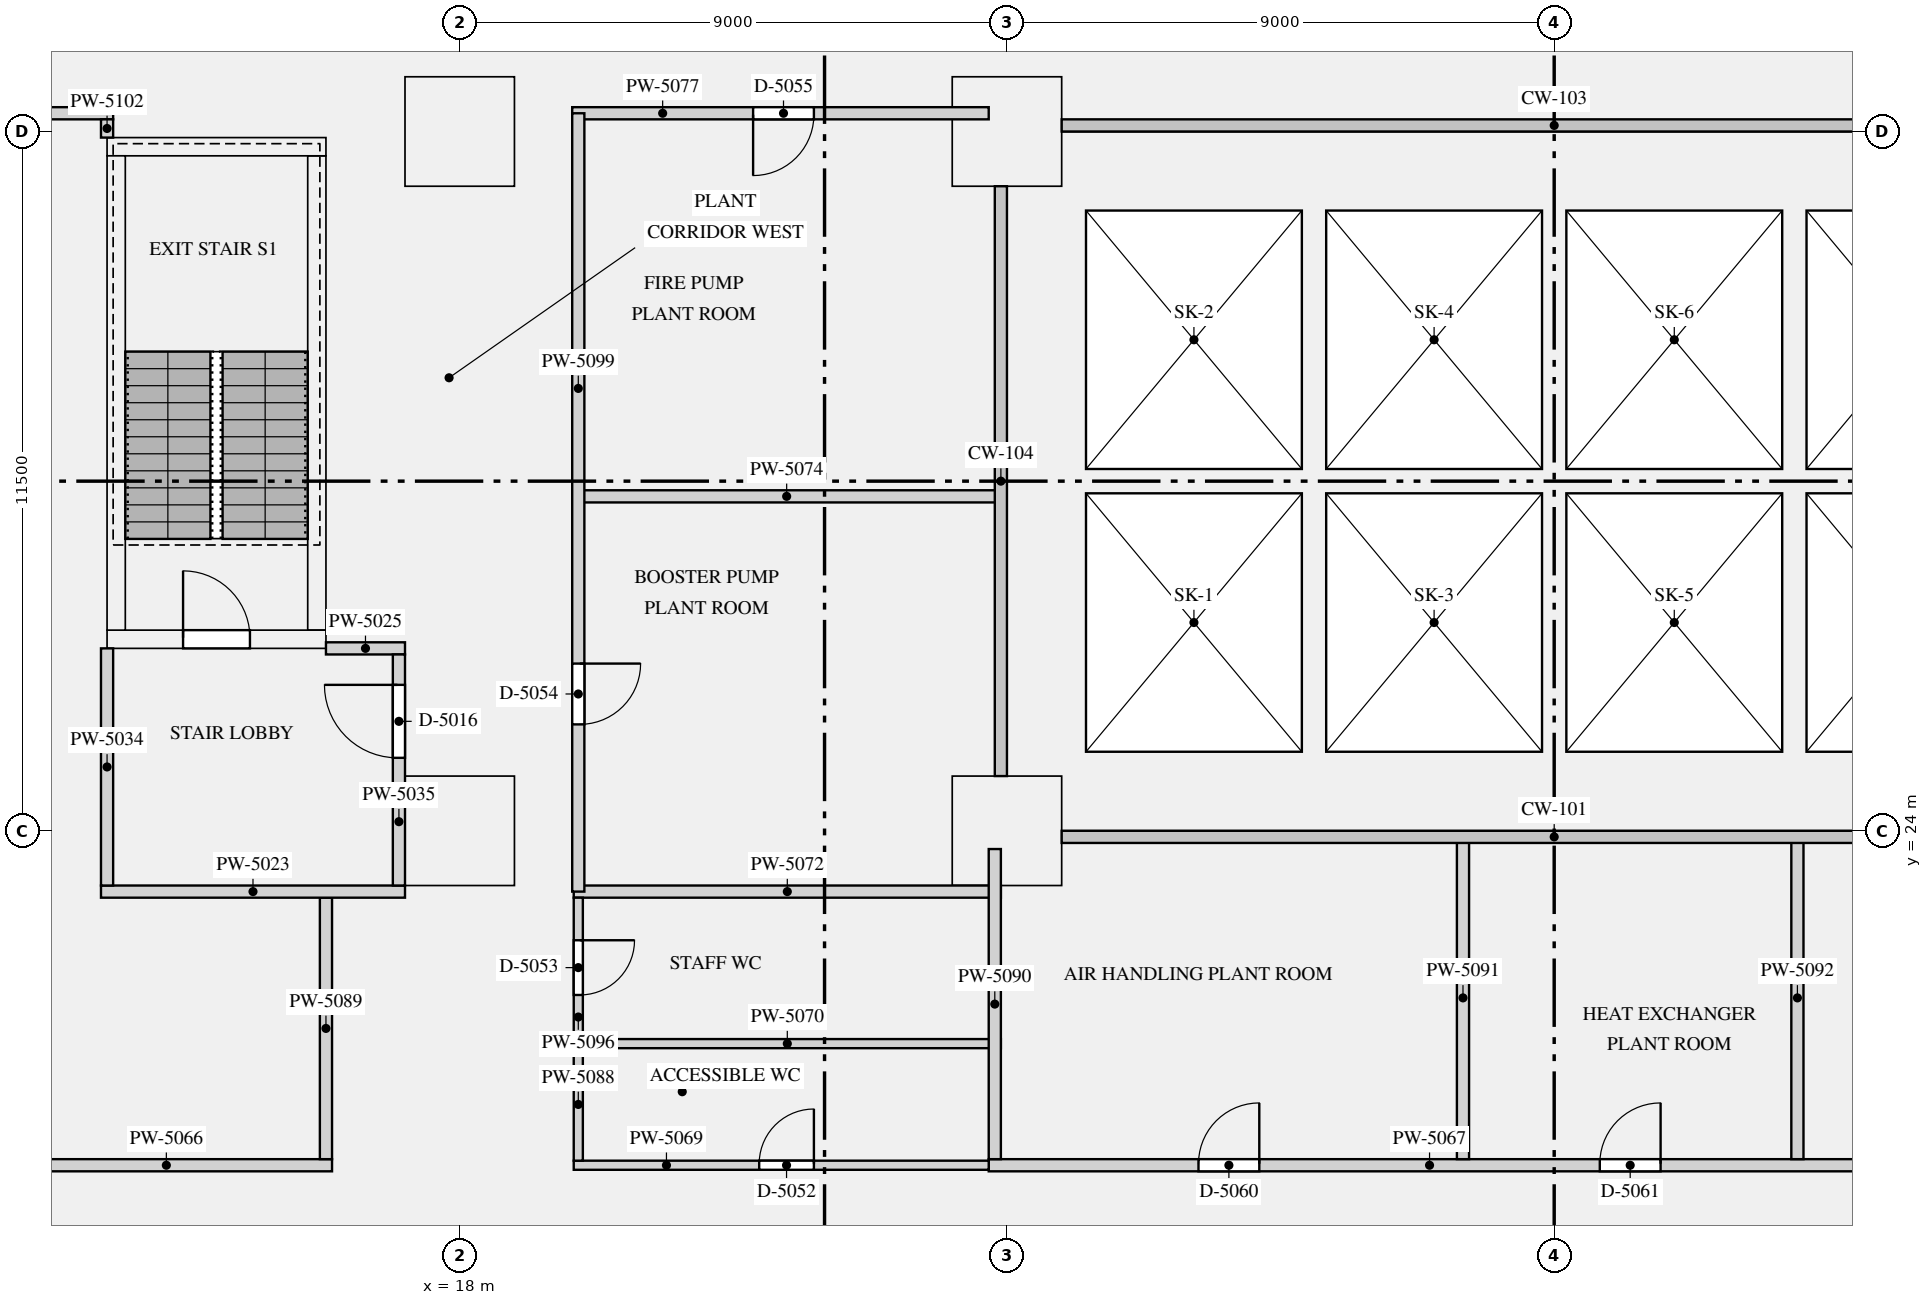
"""IFC4 building model, lengths in metres.
Left out: names, types, materials, properties, quantities, classifications, styles, units other than length and angle.
Written with IfcOpenShell. Run it as: python <this file> out.ifc"""

import sys

from ifc_helpers import new_model, si_unit, direction, frame, frame_2d, origin, origin_2d, place, context, subcontext, project, spatial, rectangle, extrude, element, fill, save


model = new_model("IFC4")
c1 = context("Model", 3, precision=1e-05, world=origin(), true_north=direction((0.0, 1.0)))
c2 = subcontext(c1, "Body", "Model", "MODEL_VIEW")
j1 = project(units=[si_unit("LENGTHUNIT", "METRE"), si_unit("PLANEANGLEUNIT", "RADIAN")], contexts=[c1])
p1 = place(None, origin())
s1 = spatial("IfcSite", under=j1, at=p1, CompositionType="ELEMENT")
p2 = place(p1, origin())
s2 = spatial("IfcBuilding", under=s1, at=p2, CompositionType="ELEMENT")
p3 = place(p2, frame((0.0, 0.0, 15.5)))
s3 = spatial("IfcBuildingStorey", under=s2, at=p3, CompositionType="ELEMENT", Elevation=15.5)
for number, where, z_axis, x_axis in (
    (1, (18.0, 24.0, 0.0), (0.0, 0.0, 1.0), (1.0, 0.0, 0.0)),
    (2, (18.0, 35.5, 0.0), (0.0, 0.0, 1.0), (1.0, 0.0, 0.0)),
    (3, (27.0, 24.0, 0.0), (0.0, 0.0, 1.0), (1.0, 0.0, 0.0)),
    (4, (27.0, 35.5, 0.0), (0.0, 0.0, 1.0), (1.0, 0.0, 0.0)),
):
    element("IfcColumn", number, at=place(p3, frame(where, z_axis=z_axis, x_axis=x_axis)), inside=s3, PredefinedType="COLUMN", context=c2, shape_type="SweptSolid", body=[
        extrude(rectangle(XDim=1.8, YDim=1.8, at=origin_2d()), origin(), (0.0, 0.0, 1.0), 4.0),
    ])
p4 = place(p3, frame((12.2, 27.15, 0.0), z_axis=(0.0, 0.0, 1.0), x_axis=(1.0, 0.0, 0.0)))
e5 = element("IfcWall", 5, at=p4, inside=s3, PredefinedType="SHEAR", context=c2, shape_type="SweptSolid", body=[
    extrude(rectangle(XDim=3.6, YDim=0.3, at=frame_2d((1.8, 0.0))), origin(), (0.0, 0.0, 1.0), 4.0),
])
p5 = place(p4, frame((1.25, 0.0, 0.0)))
e6 = element("IfcOpeningElement", 6, at=p5, cuts=e5, PredefinedType="OPENING", context=c2, shape_type="SweptSolid", body=[
    extrude(rectangle(XDim=1.1, YDim=2.1, at=frame_2d((0.55, 1.05))), frame((0.0, 0.16, 0.0), z_axis=(0.0, -1.0, 0.0), x_axis=(1.0, 0.0, 0.0)), (0.0, 0.0, 1.0), 0.32),
])
p6 = place(p3, frame((12.2, 35.25, 0.0), z_axis=(0.0, 0.0, 1.0), x_axis=(1.0, 0.0, 0.0)))
e7 = element("IfcWall", 7, at=p6, inside=s3, PredefinedType="SHEAR", context=c2, shape_type="SweptSolid", body=[
    extrude(rectangle(XDim=3.6, YDim=0.3, at=frame_2d((1.8, 0.0))), origin(), (0.0, 0.0, 1.0), 4.0),
])
for number, where, z_axis, x_axis in (
    (8, (12.35, 27.3, 0.0), (0.0, 0.0, 1.0), (0.0, 1.0, 0.0)),
    (9, (15.65, 27.3, 0.0), (0.0, 0.0, 1.0), (0.0, 1.0, 0.0)),
):
    element("IfcWall", number, at=place(p3, frame(where, z_axis=z_axis, x_axis=x_axis)), inside=s3, PredefinedType="SHEAR", context=c2, shape_type="SweptSolid", body=[
        extrude(rectangle(XDim=7.8, YDim=0.3, at=frame_2d((3.9, 0.0))), origin(), (0.0, 0.0, 1.0), 4.0),
    ])
p7 = place(p3, frame((12.1, 23.0, 0.0), z_axis=(0.0, 0.0, 1.0), x_axis=(1.0, 0.0, 0.0)))
e10 = element("IfcWall", 10, at=p7, inside=s3, PredefinedType="PARTITIONING", context=c2, shape_type="SweptSolid", body=[
    extrude(rectangle(XDim=5.0, YDim=0.2, at=frame_2d((2.5, 0.0))), origin(), (0.0, 0.0, 1.0), 3.68),
])
p8 = place(p3, frame((15.8, 27.0, 0.0), z_axis=(0.0, 0.0, 1.0), x_axis=(1.0, 0.0, 0.0)))
e11 = element("IfcWall", 11, at=p8, inside=s3, PredefinedType="PARTITIONING", context=c2, shape_type="SweptSolid", body=[
    extrude(rectangle(XDim=1.3, YDim=0.2, at=frame_2d((0.65, 0.0))), origin(), (0.0, 0.0, 1.0), 3.68),
])
p9 = place(p3, frame((12.2, 23.1, 0.0), z_axis=(0.0, 0.0, 1.0), x_axis=(0.0, 1.0, 0.0)))
e12 = element("IfcWall", 12, at=p9, inside=s3, PredefinedType="PARTITIONING", context=c2, shape_type="SweptSolid", body=[
    extrude(rectangle(XDim=3.9, YDim=0.2, at=frame_2d((1.95, 0.0))), origin(), (0.0, 0.0, 1.0), 3.68),
])
p10 = place(p3, frame((17.0, 23.1, 0.0), z_axis=(0.0, 0.0, 1.0), x_axis=(0.0, 1.0, 0.0)))
e13 = element("IfcWall", 13, at=p10, inside=s3, PredefinedType="PARTITIONING", context=c2, shape_type="SweptSolid", body=[
    extrude(rectangle(XDim=3.8, YDim=0.2, at=frame_2d((1.9, 0.0))), origin(), (0.0, 0.0, 1.0), 3.68),
])
p11 = place(p10, frame((2.1, 0.0, 0.0)))
e14 = element("IfcOpeningElement", 14, at=p11, cuts=e13, PredefinedType="OPENING", context=c2, shape_type="SweptSolid", body=[
    extrude(rectangle(XDim=1.2, YDim=2.1, at=frame_2d((0.6, 1.05))), frame((0.0, 0.11, 0.0), z_axis=(0.0, -1.0, 0.0), x_axis=(1.0, 0.0, 0.0)), (0.0, 0.0, 1.0), 0.22),
])
p12 = place(p3, frame((4.45, 18.5, 0.0), z_axis=(0.0, 0.0, 1.0), x_axis=(1.0, 0.0, 0.0)))
e15 = element("IfcWall", 15, at=p12, inside=s3, PredefinedType="PARTITIONING", context=c2, shape_type="SweptSolid", body=[
    extrude(rectangle(XDim=11.45, YDim=0.2, at=frame_2d((5.725, 0.0))), origin(), (0.0, 0.0, 1.0), 3.68),
])
p13 = place(p12, frame((4.2, 0.0, 0.0)))
e16 = element("IfcOpeningElement", 16, at=p13, cuts=e15, PredefinedType="OPENING", context=c2, shape_type="SweptSolid", body=[
    extrude(rectangle(XDim=1.8, YDim=2.1, at=frame_2d((0.9, 1.05))), frame((0.0, 0.11, 0.0), z_axis=(0.0, -1.0, 0.0), x_axis=(1.0, 0.0, 0.0)), (0.0, 0.0, 1.0), 0.22),
])
p14 = place(p3, frame((26.7, 18.5, 0.0), z_axis=(0.0, 0.0, 1.0), x_axis=(1.0, 0.0, 0.0)))
e17 = element("IfcWall", 17, at=p14, inside=s3, PredefinedType="PARTITIONING", context=c2, shape_type="SweptSolid", body=[
    extrude(rectangle(XDim=25.45, YDim=0.2, at=frame_2d((12.725, 0.0))), origin(), (0.0, 0.0, 1.0), 3.68),
])
p15 = place(p14, frame((21.425, 0.0, 0.0)))
e18 = element("IfcOpeningElement", 18, at=p15, cuts=e17, PredefinedType="OPENING", context=c2, shape_type="SweptSolid", body=[
    extrude(rectangle(XDim=1.0, YDim=2.1, at=frame_2d((0.5, 1.05))), frame((0.0, 0.11, 0.0), z_axis=(0.0, -1.0, 0.0), x_axis=(1.0, 0.0, 0.0)), (0.0, 0.0, 1.0), 0.22),
])
p16 = place(p14, frame((3.45, 0.0, 0.0)))
e19 = element("IfcOpeningElement", 19, at=p16, cuts=e17, PredefinedType="OPENING", context=c2, shape_type="SweptSolid", body=[
    extrude(rectangle(XDim=1.0, YDim=2.1, at=frame_2d((0.5, 1.05))), frame((0.0, 0.11, 0.0), z_axis=(0.0, -1.0, 0.0), x_axis=(1.0, 0.0, 0.0)), (0.0, 0.0, 1.0), 0.22),
])
p17 = place(p14, frame((10.05, 0.0, 0.0)))
e20 = element("IfcOpeningElement", 20, at=p17, cuts=e17, PredefinedType="OPENING", context=c2, shape_type="SweptSolid", body=[
    extrude(rectangle(XDim=1.0, YDim=2.1, at=frame_2d((0.5, 1.05))), frame((0.0, 0.11, 0.0), z_axis=(0.0, -1.0, 0.0), x_axis=(1.0, 0.0, 0.0)), (0.0, 0.0, 1.0), 0.22),
])
p18 = place(p14, frame((15.4, 0.0, 0.0)))
e21 = element("IfcOpeningElement", 21, at=p18, cuts=e17, PredefinedType="OPENING", context=c2, shape_type="SweptSolid", body=[
    extrude(rectangle(XDim=1.0, YDim=2.1, at=frame_2d((0.5, 1.05))), frame((0.0, 0.11, 0.0), z_axis=(0.0, -1.0, 0.0), x_axis=(1.0, 0.0, 0.0)), (0.0, 0.0, 1.0), 0.22),
])
p19 = place(p3, frame((19.875, 18.5, 0.0), z_axis=(0.0, 0.0, 1.0), x_axis=(1.0, 0.0, 0.0)))
e22 = element("IfcWall", 22, at=p19, inside=s3, PredefinedType="PARTITIONING", context=c2, shape_type="SweptSolid", body=[
    extrude(rectangle(XDim=6.825, YDim=0.15, at=frame_2d((3.413, 0.0))), origin(), (0.0, 0.0, 1.0), 3.68),
])
p20 = place(p19, frame((3.05, 0.0, 0.0)))
e23 = element("IfcOpeningElement", 23, at=p20, cuts=e22, PredefinedType="OPENING", context=c2, shape_type="SweptSolid", body=[
    extrude(rectangle(XDim=0.9, YDim=2.1, at=frame_2d((0.45, 1.05))), frame((0.0, 0.085, 0.0), z_axis=(0.0, -1.0, 0.0), x_axis=(1.0, 0.0, 0.0)), (0.0, 0.0, 1.0), 0.17),
])
p21 = place(p3, frame((19.875, 20.5, 0.0), z_axis=(0.0, 0.0, 1.0), x_axis=(1.0, 0.0, 0.0)))
e24 = element("IfcWall", 24, at=p21, inside=s3, PredefinedType="PARTITIONING", context=c2, shape_type="SweptSolid", body=[
    extrude(rectangle(XDim=7.025, YDim=0.15, at=frame_2d((3.512, 0.0))), origin(), (0.0, 0.0, 1.0), 3.68),
])
p22 = place(p3, frame((19.875, 23.0, 0.0), z_axis=(0.0, 0.0, 1.0), x_axis=(1.0, 0.0, 0.0)))
e25 = element("IfcWall", 25, at=p22, inside=s3, PredefinedType="PARTITIONING", context=c2, shape_type="SweptSolid", body=[
    extrude(rectangle(XDim=7.025, YDim=0.2, at=frame_2d((3.512, 0.0))), origin(), (0.0, 0.0, 1.0), 3.68),
])
p23 = place(p3, frame((19.85, 29.5, 0.0), z_axis=(0.0, 0.0, 1.0), x_axis=(1.0, 0.0, 0.0)))
e26 = element("IfcWall", 26, at=p23, inside=s3, PredefinedType="PARTITIONING", context=c2, shape_type="SweptSolid", body=[
    extrude(rectangle(XDim=7.054, YDim=0.2, at=frame_2d((3.527, 0.0))), origin(), (0.0, 0.0, 1.0), 3.68),
])
p24 = place(p3, frame((2.35, 35.8, 0.0), z_axis=(0.0, 0.0, 1.0), x_axis=(1.0, 0.0, 0.0)))
e27 = element("IfcWall", 27, at=p24, inside=s3, PredefinedType="PARTITIONING", context=c2, shape_type="SweptSolid", body=[
    extrude(rectangle(XDim=9.95, YDim=0.2, at=frame_2d((4.975, 0.0))), origin(), (0.0, 0.0, 1.0), 3.68),
])
p25 = place(p3, frame((19.85, 35.8, 0.0), z_axis=(0.0, 0.0, 1.0), x_axis=(1.0, 0.0, 0.0)))
e28 = element("IfcWall", 28, at=p25, inside=s3, PredefinedType="PARTITIONING", context=c2, shape_type="SweptSolid", body=[
    extrude(rectangle(XDim=6.85, YDim=0.2, at=frame_2d((3.425, 0.0))), origin(), (0.0, 0.0, 1.0), 3.68),
])
p26 = place(p25, frame((2.975, 0.0, 0.0)))
e29 = element("IfcOpeningElement", 29, at=p26, cuts=e28, PredefinedType="OPENING", context=c2, shape_type="SweptSolid", body=[
    extrude(rectangle(XDim=1.0, YDim=2.1, at=frame_2d((0.5, 1.05))), frame((0.0, 0.11, 0.0), z_axis=(0.0, -1.0, 0.0), x_axis=(1.0, 0.0, 0.0)), (0.0, 0.0, 1.0), 0.22),
])
p27 = place(p3, frame((19.95, 18.575, 0.0), z_axis=(0.0, 0.0, 1.0), x_axis=(0.0, 1.0, 0.0)))
e30 = element("IfcWall", 30, at=p27, inside=s3, PredefinedType="PARTITIONING", context=c2, shape_type="SweptSolid", body=[
    extrude(rectangle(XDim=1.85, YDim=0.15, at=frame_2d((0.925, 0.0))), origin(), (0.0, 0.0, 1.0), 3.68),
])
p28 = place(p3, frame((15.8, 18.6, 0.0), z_axis=(0.0, 0.0, 1.0), x_axis=(0.0, 1.0, 0.0)))
e31 = element("IfcWall", 31, at=p28, inside=s3, PredefinedType="PARTITIONING", context=c2, shape_type="SweptSolid", body=[
    extrude(rectangle(XDim=4.3, YDim=0.2, at=frame_2d((2.15, 0.0))), origin(), (0.0, 0.0, 1.0), 3.68),
])
p29 = place(p3, frame((26.8, 18.6, 0.0), z_axis=(0.0, 0.0, 1.0), x_axis=(0.0, 1.0, 0.0)))
e32 = element("IfcWall", 32, at=p29, inside=s3, PredefinedType="PARTITIONING", context=c2, shape_type="SweptSolid", body=[
    extrude(rectangle(XDim=5.1, YDim=0.2, at=frame_2d((2.55, 0.0))), origin(), (0.0, 0.0, 1.0), 3.68),
])
for number, where, z_axis, x_axis in (
    (33, (34.5, 18.6, 0.0), (0.0, 0.0, 1.0), (0.0, 1.0, 0.0)),
    (34, (40.0, 18.6, 0.0), (0.0, 0.0, 1.0), (0.0, 1.0, 0.0)),
):
    element("IfcWall", number, at=place(p3, frame(where, z_axis=z_axis, x_axis=x_axis)), inside=s3, PredefinedType="PARTITIONING", context=c2, shape_type="SweptSolid", body=[
        extrude(rectangle(XDim=5.304, YDim=0.2, at=frame_2d((2.652, 0.0))), origin(), (0.0, 0.0, 1.0), 3.68),
    ])
p30 = place(p3, frame((19.95, 20.575, 0.0), z_axis=(0.0, 0.0, 1.0), x_axis=(0.0, 1.0, 0.0)))
e35 = element("IfcWall", 35, at=p30, inside=s3, PredefinedType="PARTITIONING", context=c2, shape_type="SweptSolid", body=[
    extrude(rectangle(XDim=2.325, YDim=0.15, at=frame_2d((1.163, 0.0))), origin(), (0.0, 0.0, 1.0), 3.68),
])
p31 = place(p30, frame((0.725, 0.0, 0.0)))
e36 = element("IfcOpeningElement", 36, at=p31, cuts=e35, PredefinedType="OPENING", context=c2, shape_type="SweptSolid", body=[
    extrude(rectangle(XDim=0.9, YDim=2.1, at=frame_2d((0.45, 1.05))), frame((0.0, 0.085, 0.0), z_axis=(0.0, -1.0, 0.0), x_axis=(1.0, 0.0, 0.0)), (0.0, 0.0, 1.0), 0.17),
])
p32 = place(p3, frame((19.95, 23.0, 0.0), z_axis=(0.0, 0.0, 1.0), x_axis=(0.0, 1.0, 0.0)))
e37 = element("IfcWall", 37, at=p32, inside=s3, PredefinedType="PARTITIONING", context=c2, shape_type="SweptSolid", body=[
    extrude(rectangle(XDim=12.8, YDim=0.2, at=frame_2d((6.4, 0.0))), origin(), (0.0, 0.0, 1.0), 3.68),
])
p33 = place(p32, frame((2.75, 0.0, 0.0)))
e38 = element("IfcOpeningElement", 38, at=p33, cuts=e37, PredefinedType="OPENING", context=c2, shape_type="SweptSolid", body=[
    extrude(rectangle(XDim=1.0, YDim=2.1, at=frame_2d((0.5, 1.05))), frame((0.0, 0.11, 0.0), z_axis=(0.0, -1.0, 0.0), x_axis=(1.0, 0.0, 0.0)), (0.0, 0.0, 1.0), 0.22),
])
p34 = place(p3, frame((12.2, 35.4, 0.0), z_axis=(0.0, 0.0, 1.0), x_axis=(0.0, 1.0, 0.0)))
e39 = element("IfcWall", 39, at=p34, inside=s3, PredefinedType="PARTITIONING", context=c2, shape_type="SweptSolid", body=[
    extrude(rectangle(XDim=0.3, YDim=0.2, at=frame_2d((0.15, 0.0))), origin(), (0.0, 0.0, 1.0), 3.68),
])
p35 = place(p3, frame((0.0, 0.0, -0.6)))
p36 = place(p35, frame((30.075, 27.425, 0.0)))
p37 = place(p36, frame((0.0, 0.0, 0.55)))
e40 = element("IfcWindow", 40, at=p37, inside=s3, PartitioningType="SINGLE_PANEL", PredefinedType="SKYLIGHT", context=c2, shape_type="SweptSolid", body=[
    extrude(rectangle(XDim=3.55, YDim=4.25, at=origin_2d()), origin(), (0.0, 0.0, 1.0), 0.05),
])
p38 = place(p35, frame((30.075, 32.075, 0.0)))
p39 = place(p38, frame((0.0, 0.0, 0.55)))
e41 = element("IfcWindow", 41, at=p39, inside=s3, PartitioningType="SINGLE_PANEL", PredefinedType="SKYLIGHT", context=c2, shape_type="SweptSolid", body=[
    extrude(rectangle(XDim=3.55, YDim=4.25, at=origin_2d()), origin(), (0.0, 0.0, 1.0), 0.05),
])
p40 = place(p35, frame((34.025, 27.425, 0.0)))
p41 = place(p40, frame((0.0, 0.0, 0.55)))
e42 = element("IfcWindow", 42, at=p41, inside=s3, PartitioningType="SINGLE_PANEL", PredefinedType="SKYLIGHT", context=c2, shape_type="SweptSolid", body=[
    extrude(rectangle(XDim=3.55, YDim=4.25, at=origin_2d()), origin(), (0.0, 0.0, 1.0), 0.05),
])
p42 = place(p35, frame((34.025, 32.075, 0.0)))
p43 = place(p42, frame((0.0, 0.0, 0.55)))
e43 = element("IfcWindow", 43, at=p43, inside=s3, PartitioningType="SINGLE_PANEL", PredefinedType="SKYLIGHT", context=c2, shape_type="SweptSolid", body=[
    extrude(rectangle(XDim=3.55, YDim=4.25, at=origin_2d()), origin(), (0.0, 0.0, 1.0), 0.05),
])
p44 = place(p35, frame((37.975, 27.425, 0.0)))
p45 = place(p44, frame((0.0, 0.0, 0.55)))
e44 = element("IfcWindow", 44, at=p45, inside=s3, PartitioningType="SINGLE_PANEL", PredefinedType="SKYLIGHT", context=c2, shape_type="SweptSolid", body=[
    extrude(rectangle(XDim=3.55, YDim=4.25, at=origin_2d()), origin(), (0.0, 0.0, 1.0), 0.05),
])
p46 = place(p35, frame((37.975, 32.075, 0.0)))
p47 = place(p46, frame((0.0, 0.0, 0.55)))
e45 = element("IfcWindow", 45, at=p47, inside=s3, PartitioningType="SINGLE_PANEL", PredefinedType="SKYLIGHT", context=c2, shape_type="SweptSolid", body=[
    extrude(rectangle(XDim=3.55, YDim=4.25, at=origin_2d()), origin(), (0.0, 0.0, 1.0), 0.05),
])
p48 = place(p35, frame((41.925, 27.425, 0.0)))
p49 = place(p48, frame((0.0, 0.0, 0.55)))
e46 = element("IfcWindow", 46, at=p49, inside=s3, PartitioningType="SINGLE_PANEL", PredefinedType="SKYLIGHT", context=c2, shape_type="SweptSolid", body=[
    extrude(rectangle(XDim=3.55, YDim=4.25, at=origin_2d()), origin(), (0.0, 0.0, 1.0), 0.05),
])
p50 = place(p35, frame((41.925, 32.075, 0.0)))
p51 = place(p50, frame((0.0, 0.0, 0.55)))
e47 = element("IfcWindow", 47, at=p51, inside=s3, PartitioningType="SINGLE_PANEL", PredefinedType="SKYLIGHT", context=c2, shape_type="SweptSolid", body=[
    extrude(rectangle(XDim=3.55, YDim=4.25, at=origin_2d()), origin(), (0.0, 0.0, 1.0), 0.05),
])
p52 = place(p5, origin())
e48 = element("IfcDoor", 48, at=p52, inside=s3, OperationType="SINGLE_SWING_LEFT", PredefinedType="DOOR", context=c2, shape_type="SweptSolid", body=[
    extrude(rectangle(XDim=1.1, YDim=2.1, at=frame_2d((0.55, 1.05))), frame((0.0, 0.025, 0.0), z_axis=(0.0, -1.0, 0.0), x_axis=(1.0, 0.0, 0.0)), (0.0, 0.0, 1.0), 0.05),
])
fill(e6, e48)
p53 = place(p11, origin())
e49 = element("IfcDoor", 49, at=p53, inside=s3, OperationType="SINGLE_SWING_RIGHT", PredefinedType="DOOR", context=c2, shape_type="SweptSolid", body=[
    extrude(rectangle(XDim=1.2, YDim=2.1, at=frame_2d((0.6, 1.05))), frame((0.0, 0.025, 0.0), z_axis=(0.0, -1.0, 0.0), x_axis=(1.0, 0.0, 0.0)), (0.0, 0.0, 1.0), 0.05),
])
fill(e14, e49)
p54 = place(p20, origin())
e50 = element("IfcDoor", 50, at=p54, inside=s3, OperationType="SINGLE_SWING_RIGHT", PredefinedType="DOOR", context=c2, shape_type="SweptSolid", body=[
    extrude(rectangle(XDim=0.9, YDim=2.1, at=frame_2d((0.45, 1.05))), frame((0.0, 0.025, 0.0), z_axis=(0.0, -1.0, 0.0), x_axis=(1.0, 0.0, 0.0)), (0.0, 0.0, 1.0), 0.05),
])
fill(e23, e50)
p55 = place(p31, frame((0.9, 0.0, 0.0), z_axis=(0.0, 0.0, 1.0), x_axis=(-1.0, 0.0, 0.0)))
e51 = element("IfcDoor", 51, at=p55, inside=s3, OperationType="SINGLE_SWING_LEFT", PredefinedType="DOOR", context=c2, shape_type="SweptSolid", body=[
    extrude(rectangle(XDim=0.9, YDim=2.1, at=frame_2d((0.45, 1.05))), frame((0.0, 0.025, 0.0), z_axis=(0.0, -1.0, 0.0), x_axis=(1.0, 0.0, 0.0)), (0.0, 0.0, 1.0), 0.05),
])
fill(e36, e51)
p56 = place(p33, frame((1.0, 0.0, 0.0), z_axis=(0.0, 0.0, 1.0), x_axis=(-1.0, 0.0, 0.0)))
e52 = element("IfcDoor", 52, at=p56, inside=s3, OperationType="SINGLE_SWING_LEFT", PredefinedType="DOOR", context=c2, shape_type="SweptSolid", body=[
    extrude(rectangle(XDim=1.0, YDim=2.1, at=frame_2d((0.5, 1.05))), frame((0.0, 0.025, 0.0), z_axis=(0.0, -1.0, 0.0), x_axis=(1.0, 0.0, 0.0)), (0.0, 0.0, 1.0), 0.05),
])
fill(e38, e52)
p57 = place(p26, frame((1.0, 0.0, 0.0), z_axis=(0.0, 0.0, 1.0), x_axis=(-1.0, 0.0, 0.0)))
e53 = element("IfcDoor", 53, at=p57, inside=s3, OperationType="SINGLE_SWING_RIGHT", PredefinedType="DOOR", context=c2, shape_type="SweptSolid", body=[
    extrude(rectangle(XDim=1.0, YDim=2.1, at=frame_2d((0.5, 1.05))), frame((0.0, 0.025, 0.0), z_axis=(0.0, -1.0, 0.0), x_axis=(1.0, 0.0, 0.0)), (0.0, 0.0, 1.0), 0.05),
])
fill(e29, e53)
p58 = place(p16, origin())
e54 = element("IfcDoor", 54, at=p58, inside=s3, OperationType="SINGLE_SWING_RIGHT", PredefinedType="DOOR", context=c2, shape_type="SweptSolid", body=[
    extrude(rectangle(XDim=1.0, YDim=2.1, at=frame_2d((0.5, 1.05))), frame((0.0, 0.025, 0.0), z_axis=(0.0, -1.0, 0.0), x_axis=(1.0, 0.0, 0.0)), (0.0, 0.0, 1.0), 0.05),
])
fill(e19, e54)
p59 = place(p17, origin())
e55 = element("IfcDoor", 55, at=p59, inside=s3, OperationType="SINGLE_SWING_RIGHT", PredefinedType="DOOR", context=c2, shape_type="SweptSolid", body=[
    extrude(rectangle(XDim=1.0, YDim=2.1, at=frame_2d((0.5, 1.05))), frame((0.0, 0.025, 0.0), z_axis=(0.0, -1.0, 0.0), x_axis=(1.0, 0.0, 0.0)), (0.0, 0.0, 1.0), 0.05),
])
fill(e20, e55)
save(model, sys.argv[1])
